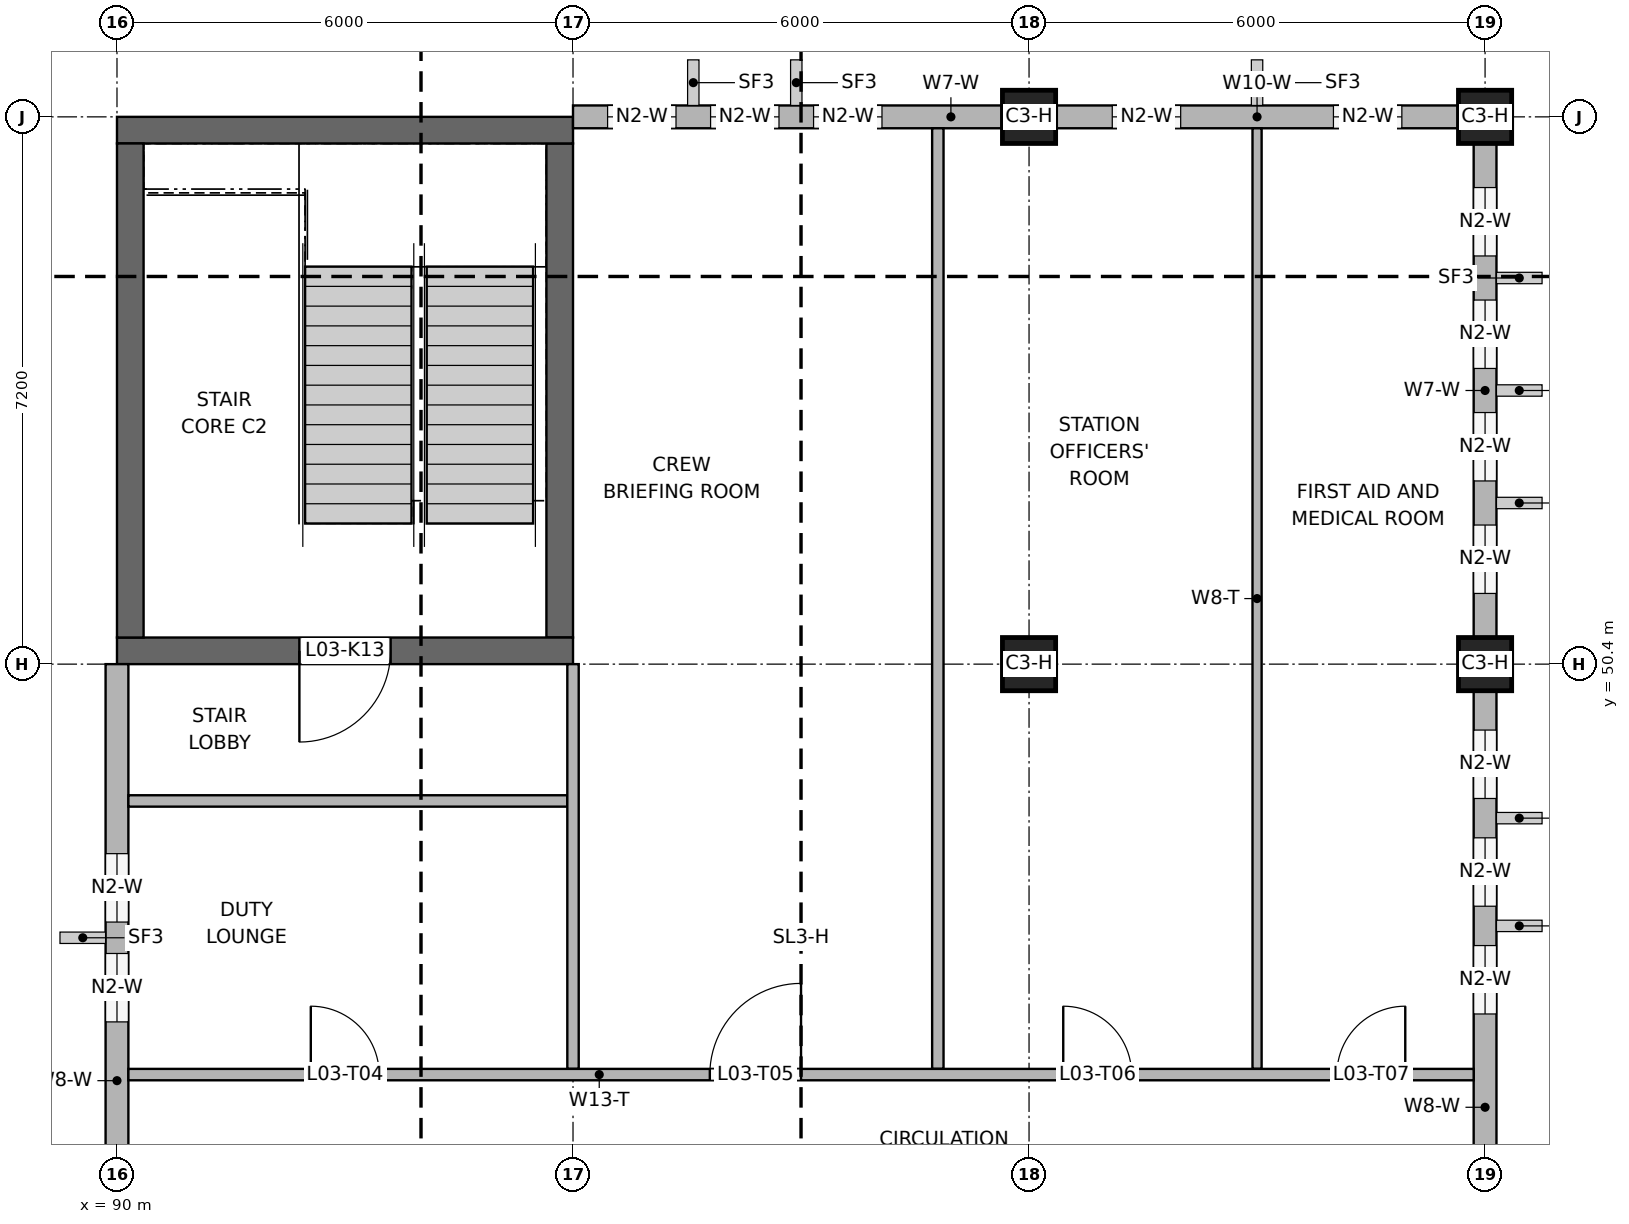
"""IFC4 building model, lengths in metres.
Left out: names, types, materials, properties, quantities, classifications, styles, units other than length and angle.
Written with IfcOpenShell. Run it as: python <this file> out.ifc"""

import sys

from ifc_helpers import new_model, si_unit, direction, frame, frame_2d, origin, origin_2d, place, context, subcontext, project, spatial, rectangle, extrude, element, fill, save


model = new_model("IFC4")
c1 = context("Model", 3, precision=1e-05, world=origin(), true_north=direction((0.0, 1.0)))
c2 = subcontext(c1, "Body", "Model", "MODEL_VIEW")
j1 = project(units=[si_unit("LENGTHUNIT", "METRE"), si_unit("PLANEANGLEUNIT", "RADIAN")], contexts=[c1])
p1 = place(None, origin())
s1 = spatial("IfcSite", under=j1, at=p1, CompositionType="ELEMENT")
p2 = place(p1, origin())
s2 = spatial("IfcBuilding", under=s1, at=p2, CompositionType="ELEMENT")
p3 = place(p2, frame((0.0, 0.0, 12.6)))
s3 = spatial("IfcBuildingStorey", under=s2, at=p3, CompositionType="ELEMENT", Elevation=12.6)
p4 = place(p3, frame((90.0, 50.575, 0.0), z_axis=(0.0, 0.0, 1.0), x_axis=(1.0, 0.0, 0.0)))
e1 = element("IfcWall", 1, at=p4, inside=s3, PredefinedType="SHEAR", context=c2, shape_type="SweptSolid", body=[
    extrude(rectangle(XDim=6.0, YDim=0.35, at=frame_2d((3.0, 0.0))), origin(), (0.0, 0.0, 1.0), 4.0),
])
p5 = place(p4, frame((2.4, 0.0, 0.0)))
e2 = element("IfcOpeningElement", 2, at=p5, cuts=e1, PredefinedType="OPENING", context=c2, shape_type="SweptSolid", body=[
    extrude(rectangle(XDim=1.2, YDim=2.1, at=frame_2d((0.6, 1.05))), frame((0.0, 0.185, 0.0), z_axis=(0.0, -1.0, 0.0), x_axis=(1.0, 0.0, 0.0)), (0.0, 0.0, 1.0), 0.37),
])
p6 = place(p3, frame((90.0, 57.425, 0.0), z_axis=(0.0, 0.0, 1.0), x_axis=(1.0, 0.0, 0.0)))
e3 = element("IfcWall", 3, at=p6, inside=s3, PredefinedType="SHEAR", context=c2, shape_type="SweptSolid", body=[
    extrude(rectangle(XDim=6.0, YDim=0.35, at=frame_2d((3.0, 0.0))), origin(), (0.0, 0.0, 1.0), 4.0),
])
for number, where, z_axis, x_axis in (
    (4, (90.175, 50.75, 0.0), (0.0, 0.0, 1.0), (0.0, 1.0, 0.0)),
    (5, (95.825, 50.75, 0.0), (0.0, 0.0, 1.0), (0.0, 1.0, 0.0)),
):
    element("IfcWall", number, at=place(p3, frame(where, z_axis=z_axis, x_axis=x_axis)), inside=s3, PredefinedType="SHEAR", context=c2, shape_type="SweptSolid", body=[
        extrude(rectangle(XDim=6.5, YDim=0.35, at=frame_2d((3.25, 0.0))), origin(), (0.0, 0.0, 1.0), 4.0),
    ])
for number, where, z_axis, x_axis in (
    (6, (102.0, 50.4, 0.0), (0.0, 0.0, 1.0), (1.0, 0.0, 0.0)),
    (7, (108.0, 50.4, 0.0), (0.0, 0.0, 1.0), (1.0, 0.0, 0.0)),
    (8, (102.0, 57.6, 0.0), (0.0, 0.0, 1.0), (1.0, 0.0, 0.0)),
    (9, (108.0, 57.6, 0.0), (0.0, 0.0, 1.0), (1.0, 0.0, 0.0)),
):
    element("IfcColumn", number, at=place(p3, frame(where, z_axis=z_axis, x_axis=x_axis)), inside=s3, PredefinedType="COLUMN", context=c2, shape_type="SweptSolid", body=[
        extrude(rectangle(XDim=0.7, YDim=0.7, at=origin_2d()), origin(), (0.0, 0.0, 1.0), 4.0),
    ])
p7 = place(p3, frame((90.0, 43.55, 0.0), z_axis=(0.0, 0.0, 1.0), x_axis=(0.0, 1.0, 0.0)))
e10 = element("IfcWall", 10, at=p7, inside=s3, PredefinedType="SOLIDWALL", context=c2, shape_type="SweptSolid", body=[
    extrude(rectangle(XDim=6.85, YDim=0.3, at=frame_2d((3.425, 0.0))), origin(), (0.0, 0.0, 1.0), 3.1),
])
p8 = place(p7, frame((2.143, 0.0, 0.9)))
e11 = element("IfcOpeningElement", 11, at=p8, cuts=e10, PredefinedType="OPENING", context=c2, shape_type="SweptSolid", body=[
    extrude(rectangle(XDim=0.9, YDim=1.2, at=frame_2d((0.45, 0.6))), frame((0.0, 0.16, 0.0), z_axis=(0.0, -1.0, 0.0), x_axis=(1.0, 0.0, 0.0)), (0.0, 0.0, 1.0), 0.32),
])
p9 = place(p7, frame((3.457, 0.0, 0.9)))
e12 = element("IfcOpeningElement", 12, at=p9, cuts=e10, PredefinedType="OPENING", context=c2, shape_type="SweptSolid", body=[
    extrude(rectangle(XDim=0.9, YDim=1.2, at=frame_2d((0.45, 0.6))), frame((0.0, 0.16, 0.0), z_axis=(0.0, -1.0, 0.0), x_axis=(1.0, 0.0, 0.0)), (0.0, 0.0, 1.0), 0.32),
])
p10 = place(p3, frame((108.0, 43.2, 0.0), z_axis=(0.0, 0.0, 1.0), x_axis=(0.0, 1.0, 0.0)))
e13 = element("IfcWall", 13, at=p10, inside=s3, PredefinedType="SOLIDWALL", context=c2, shape_type="SweptSolid", body=[
    extrude(rectangle(XDim=6.85, YDim=0.3, at=frame_2d((3.425, 0.0))), origin(), (0.0, 0.0, 1.0), 3.1),
])
p11 = place(p10, frame((2.597, 0.0, 0.9)))
e14 = element("IfcOpeningElement", 14, at=p11, cuts=e13, PredefinedType="OPENING", context=c2, shape_type="SweptSolid", body=[
    extrude(rectangle(XDim=0.9, YDim=1.2, at=frame_2d((0.45, 0.6))), frame((0.0, 0.16, 0.0), z_axis=(0.0, -1.0, 0.0), x_axis=(1.0, 0.0, 0.0)), (0.0, 0.0, 1.0), 0.32),
])
p12 = place(p10, frame((4.015, 0.0, 0.9)))
e15 = element("IfcOpeningElement", 15, at=p12, cuts=e13, PredefinedType="OPENING", context=c2, shape_type="SweptSolid", body=[
    extrude(rectangle(XDim=0.9, YDim=1.2, at=frame_2d((0.45, 0.6))), frame((0.0, 0.16, 0.0), z_axis=(0.0, -1.0, 0.0), x_axis=(1.0, 0.0, 0.0)), (0.0, 0.0, 1.0), 0.32),
])
p13 = place(p10, frame((5.433, 0.0, 0.9)))
e16 = element("IfcOpeningElement", 16, at=p13, cuts=e13, PredefinedType="OPENING", context=c2, shape_type="SweptSolid", body=[
    extrude(rectangle(XDim=0.9, YDim=1.2, at=frame_2d((0.45, 0.6))), frame((0.0, 0.16, 0.0), z_axis=(0.0, -1.0, 0.0), x_axis=(1.0, 0.0, 0.0)), (0.0, 0.0, 1.0), 0.32),
])
p14 = place(p3, frame((108.0, 50.75, 0.0), z_axis=(0.0, 0.0, 1.0), x_axis=(0.0, 1.0, 0.0)))
e17 = element("IfcWall", 17, at=p14, inside=s3, PredefinedType="SOLIDWALL", context=c2, shape_type="SweptSolid", body=[
    extrude(rectangle(XDim=6.5, YDim=0.3, at=frame_2d((3.25, 0.0))), origin(), (0.0, 0.0, 1.0), 3.2),
])
p15 = place(p14, frame((0.58, 0.0, 0.9)))
e18 = element("IfcOpeningElement", 18, at=p15, cuts=e17, PredefinedType="OPENING", context=c2, shape_type="SweptSolid", body=[
    extrude(rectangle(XDim=0.9, YDim=1.2, at=frame_2d((0.45, 0.6))), frame((0.0, 0.16, 0.0), z_axis=(0.0, -1.0, 0.0), x_axis=(1.0, 0.0, 0.0)), (0.0, 0.0, 1.0), 0.32),
])
p16 = place(p14, frame((2.06, 0.0, 0.9)))
e19 = element("IfcOpeningElement", 19, at=p16, cuts=e17, PredefinedType="OPENING", context=c2, shape_type="SweptSolid", body=[
    extrude(rectangle(XDim=0.9, YDim=1.2, at=frame_2d((0.45, 0.6))), frame((0.0, 0.16, 0.0), z_axis=(0.0, -1.0, 0.0), x_axis=(1.0, 0.0, 0.0)), (0.0, 0.0, 1.0), 0.32),
])
p17 = place(p14, frame((3.54, 0.0, 0.9)))
e20 = element("IfcOpeningElement", 20, at=p17, cuts=e17, PredefinedType="OPENING", context=c2, shape_type="SweptSolid", body=[
    extrude(rectangle(XDim=0.9, YDim=1.2, at=frame_2d((0.45, 0.6))), frame((0.0, 0.16, 0.0), z_axis=(0.0, -1.0, 0.0), x_axis=(1.0, 0.0, 0.0)), (0.0, 0.0, 1.0), 0.32),
])
p18 = place(p14, frame((5.02, 0.0, 0.9)))
e21 = element("IfcOpeningElement", 21, at=p18, cuts=e17, PredefinedType="OPENING", context=c2, shape_type="SweptSolid", body=[
    extrude(rectangle(XDim=0.9, YDim=1.2, at=frame_2d((0.45, 0.6))), frame((0.0, 0.16, 0.0), z_axis=(0.0, -1.0, 0.0), x_axis=(1.0, 0.0, 0.0)), (0.0, 0.0, 1.0), 0.32),
])
p19 = place(p3, frame((96.0, 57.6, 0.0), z_axis=(0.0, 0.0, 1.0), x_axis=(1.0, 0.0, 0.0)))
e22 = element("IfcWall", 22, at=p19, inside=s3, PredefinedType="SOLIDWALL", context=c2, shape_type="SweptSolid", body=[
    extrude(rectangle(XDim=5.65, YDim=0.3, at=frame_2d((2.825, 0.0))), origin(), (0.0, 0.0, 1.0), 3.2),
])
p20 = place(p19, frame((0.455, 0.0, 0.9)))
e23 = element("IfcOpeningElement", 23, at=p20, cuts=e22, PredefinedType="OPENING", context=c2, shape_type="SweptSolid", body=[
    extrude(rectangle(XDim=0.9, YDim=1.2, at=frame_2d((0.45, 0.6))), frame((0.0, 0.16, 0.0), z_axis=(0.0, -1.0, 0.0), x_axis=(1.0, 0.0, 0.0)), (0.0, 0.0, 1.0), 0.32),
])
p21 = place(p19, frame((1.81, 0.0, 0.9)))
e24 = element("IfcOpeningElement", 24, at=p21, cuts=e22, PredefinedType="OPENING", context=c2, shape_type="SweptSolid", body=[
    extrude(rectangle(XDim=0.9, YDim=1.2, at=frame_2d((0.45, 0.6))), frame((0.0, 0.16, 0.0), z_axis=(0.0, -1.0, 0.0), x_axis=(1.0, 0.0, 0.0)), (0.0, 0.0, 1.0), 0.32),
])
p22 = place(p19, frame((3.165, 0.0, 0.9)))
e25 = element("IfcOpeningElement", 25, at=p22, cuts=e22, PredefinedType="OPENING", context=c2, shape_type="SweptSolid", body=[
    extrude(rectangle(XDim=0.9, YDim=1.2, at=frame_2d((0.45, 0.6))), frame((0.0, 0.16, 0.0), z_axis=(0.0, -1.0, 0.0), x_axis=(1.0, 0.0, 0.0)), (0.0, 0.0, 1.0), 0.32),
])
p23 = place(p3, frame((102.35, 57.6, 0.0), z_axis=(0.0, 0.0, 1.0), x_axis=(1.0, 0.0, 0.0)))
e26 = element("IfcWall", 26, at=p23, inside=s3, PredefinedType="SOLIDWALL", context=c2, shape_type="SweptSolid", body=[
    extrude(rectangle(XDim=5.3, YDim=0.3, at=frame_2d((2.65, 0.0))), origin(), (0.0, 0.0, 1.0), 3.3),
])
p24 = place(p23, frame((0.745, 0.0, 0.9)))
e27 = element("IfcOpeningElement", 27, at=p24, cuts=e26, PredefinedType="OPENING", context=c2, shape_type="SweptSolid", body=[
    extrude(rectangle(XDim=0.9, YDim=1.2, at=frame_2d((0.45, 0.6))), frame((0.0, 0.16, 0.0), z_axis=(0.0, -1.0, 0.0), x_axis=(1.0, 0.0, 0.0)), (0.0, 0.0, 1.0), 0.32),
])
p25 = place(p23, frame((3.655, 0.0, 0.9)))
e28 = element("IfcOpeningElement", 28, at=p25, cuts=e26, PredefinedType="OPENING", context=c2, shape_type="SweptSolid", body=[
    extrude(rectangle(XDim=0.9, YDim=1.2, at=frame_2d((0.45, 0.6))), frame((0.0, 0.16, 0.0), z_axis=(0.0, -1.0, 0.0), x_axis=(1.0, 0.0, 0.0)), (0.0, 0.0, 1.0), 0.32),
])
p26 = place(p3, frame((96.0, 45.075, 0.0), z_axis=(0.0, 0.0, 1.0), x_axis=(0.0, 1.0, 0.0)))
e29 = element("IfcWall", 29, at=p26, inside=s3, PredefinedType="PARTITIONING", context=c2, shape_type="SweptSolid", body=[
    extrude(rectangle(XDim=5.325, YDim=0.15, at=frame_2d((2.663, 0.0))), origin(), (0.0, 0.0, 1.0), 4.0),
])
p27 = place(p3, frame((100.8, 45.075, 0.0), z_axis=(0.0, 0.0, 1.0), x_axis=(0.0, 1.0, 0.0)))
e30 = element("IfcWall", 30, at=p27, inside=s3, PredefinedType="PARTITIONING", context=c2, shape_type="SweptSolid", body=[
    extrude(rectangle(XDim=12.375, YDim=0.15, at=frame_2d((6.188, 0.0))), origin(), (0.0, 0.0, 1.0), 4.0),
])
p28 = place(p3, frame((105.0, 45.075, 0.0), z_axis=(0.0, 0.0, 1.0), x_axis=(0.0, 1.0, 0.0)))
e31 = element("IfcWall", 31, at=p28, inside=s3, PredefinedType="PARTITIONING", context=c2, shape_type="SweptSolid", body=[
    extrude(rectangle(XDim=12.375, YDim=0.12, at=frame_2d((6.188, 0.0))), origin(), (0.0, 0.0, 1.0), 3.3),
])
p29 = place(p3, frame((90.15, 45.0, 0.0), z_axis=(0.0, 0.0, 1.0), x_axis=(1.0, 0.0, 0.0)))
e32 = element("IfcWall", 32, at=p29, inside=s3, PredefinedType="PARTITIONING", context=c2, shape_type="SweptSolid", body=[
    extrude(rectangle(XDim=17.7, YDim=0.15, at=frame_2d((8.85, 0.0))), origin(), (0.0, 0.0, 1.0), 4.0),
])
p30 = place(p29, frame((2.4, 0.0, 0.0)))
e33 = element("IfcOpeningElement", 33, at=p30, cuts=e32, PredefinedType="OPENING", context=c2, shape_type="SweptSolid", body=[
    extrude(rectangle(XDim=0.9, YDim=2.1, at=frame_2d((0.45, 1.05))), frame((0.0, 0.085, 0.0), z_axis=(0.0, -1.0, 0.0), x_axis=(1.0, 0.0, 0.0)), (0.0, 0.0, 1.0), 0.17),
])
p31 = place(p29, frame((7.65, 0.0, 0.0)))
e34 = element("IfcOpeningElement", 34, at=p31, cuts=e32, PredefinedType="OPENING", context=c2, shape_type="SweptSolid", body=[
    extrude(rectangle(XDim=1.2, YDim=2.1, at=frame_2d((0.6, 1.05))), frame((0.0, 0.085, 0.0), z_axis=(0.0, -1.0, 0.0), x_axis=(1.0, 0.0, 0.0)), (0.0, 0.0, 1.0), 0.17),
])
p32 = place(p29, frame((12.3, 0.0, 0.0)))
e35 = element("IfcOpeningElement", 35, at=p32, cuts=e32, PredefinedType="OPENING", context=c2, shape_type="SweptSolid", body=[
    extrude(rectangle(XDim=0.9, YDim=2.1, at=frame_2d((0.45, 1.05))), frame((0.0, 0.085, 0.0), z_axis=(0.0, -1.0, 0.0), x_axis=(1.0, 0.0, 0.0)), (0.0, 0.0, 1.0), 0.17),
])
p33 = place(p29, frame((15.9, 0.0, 0.0)))
e36 = element("IfcOpeningElement", 36, at=p33, cuts=e32, PredefinedType="OPENING", context=c2, shape_type="SweptSolid", body=[
    extrude(rectangle(XDim=0.9, YDim=2.1, at=frame_2d((0.45, 1.05))), frame((0.0, 0.085, 0.0), z_axis=(0.0, -1.0, 0.0), x_axis=(1.0, 0.0, 0.0)), (0.0, 0.0, 1.0), 0.17),
])
p34 = place(p3, frame((90.15, 48.6, 0.0), z_axis=(0.0, 0.0, 1.0), x_axis=(1.0, 0.0, 0.0)))
e37 = element("IfcWall", 37, at=p34, inside=s3, PredefinedType="PARTITIONING", context=c2, shape_type="SweptSolid", body=[
    extrude(rectangle(XDim=5.775, YDim=0.15, at=frame_2d((2.888, 0.0))), origin(), (0.0, 0.0, 1.0), 4.0),
])
p35 = place(p8, origin())
e38 = element("IfcWindow", 38, at=p35, inside=s3, PartitioningType="SINGLE_PANEL", PredefinedType="WINDOW", context=c2, shape_type="SweptSolid", body=[
    extrude(rectangle(XDim=0.9, YDim=1.2, at=frame_2d((0.45, 0.6))), frame((0.0, 0.03, 0.0), z_axis=(0.0, -1.0, 0.0), x_axis=(1.0, 0.0, 0.0)), (0.0, 0.0, 1.0), 0.06),
])
fill(e11, e38)
p36 = place(p9, origin())
e39 = element("IfcWindow", 39, at=p36, inside=s3, PartitioningType="SINGLE_PANEL", PredefinedType="WINDOW", context=c2, shape_type="SweptSolid", body=[
    extrude(rectangle(XDim=0.9, YDim=1.2, at=frame_2d((0.45, 0.6))), frame((0.0, 0.03, 0.0), z_axis=(0.0, -1.0, 0.0), x_axis=(1.0, 0.0, 0.0)), (0.0, 0.0, 1.0), 0.06),
])
fill(e12, e39)
p37 = place(p11, origin())
e40 = element("IfcWindow", 40, at=p37, inside=s3, PartitioningType="SINGLE_PANEL", PredefinedType="WINDOW", context=c2, shape_type="SweptSolid", body=[
    extrude(rectangle(XDim=0.9, YDim=1.2, at=frame_2d((0.45, 0.6))), frame((0.0, 0.03, 0.0), z_axis=(0.0, -1.0, 0.0), x_axis=(1.0, 0.0, 0.0)), (0.0, 0.0, 1.0), 0.06),
])
fill(e14, e40)
p38 = place(p12, origin())
e41 = element("IfcWindow", 41, at=p38, inside=s3, PartitioningType="SINGLE_PANEL", PredefinedType="WINDOW", context=c2, shape_type="SweptSolid", body=[
    extrude(rectangle(XDim=0.9, YDim=1.2, at=frame_2d((0.45, 0.6))), frame((0.0, 0.03, 0.0), z_axis=(0.0, -1.0, 0.0), x_axis=(1.0, 0.0, 0.0)), (0.0, 0.0, 1.0), 0.06),
])
fill(e15, e41)
p39 = place(p13, origin())
e42 = element("IfcWindow", 42, at=p39, inside=s3, PartitioningType="SINGLE_PANEL", PredefinedType="WINDOW", context=c2, shape_type="SweptSolid", body=[
    extrude(rectangle(XDim=0.9, YDim=1.2, at=frame_2d((0.45, 0.6))), frame((0.0, 0.03, 0.0), z_axis=(0.0, -1.0, 0.0), x_axis=(1.0, 0.0, 0.0)), (0.0, 0.0, 1.0), 0.06),
])
fill(e16, e42)
p40 = place(p15, origin())
e43 = element("IfcWindow", 43, at=p40, inside=s3, PartitioningType="SINGLE_PANEL", PredefinedType="WINDOW", context=c2, shape_type="SweptSolid", body=[
    extrude(rectangle(XDim=0.9, YDim=1.2, at=frame_2d((0.45, 0.6))), frame((0.0, 0.03, 0.0), z_axis=(0.0, -1.0, 0.0), x_axis=(1.0, 0.0, 0.0)), (0.0, 0.0, 1.0), 0.06),
])
fill(e18, e43)
p41 = place(p16, origin())
e44 = element("IfcWindow", 44, at=p41, inside=s3, PartitioningType="SINGLE_PANEL", PredefinedType="WINDOW", context=c2, shape_type="SweptSolid", body=[
    extrude(rectangle(XDim=0.9, YDim=1.2, at=frame_2d((0.45, 0.6))), frame((0.0, 0.03, 0.0), z_axis=(0.0, -1.0, 0.0), x_axis=(1.0, 0.0, 0.0)), (0.0, 0.0, 1.0), 0.06),
])
fill(e19, e44)
p42 = place(p17, origin())
e45 = element("IfcWindow", 45, at=p42, inside=s3, PartitioningType="SINGLE_PANEL", PredefinedType="WINDOW", context=c2, shape_type="SweptSolid", body=[
    extrude(rectangle(XDim=0.9, YDim=1.2, at=frame_2d((0.45, 0.6))), frame((0.0, 0.03, 0.0), z_axis=(0.0, -1.0, 0.0), x_axis=(1.0, 0.0, 0.0)), (0.0, 0.0, 1.0), 0.06),
])
fill(e20, e45)
p43 = place(p18, origin())
e46 = element("IfcWindow", 46, at=p43, inside=s3, PartitioningType="SINGLE_PANEL", PredefinedType="WINDOW", context=c2, shape_type="SweptSolid", body=[
    extrude(rectangle(XDim=0.9, YDim=1.2, at=frame_2d((0.45, 0.6))), frame((0.0, 0.03, 0.0), z_axis=(0.0, -1.0, 0.0), x_axis=(1.0, 0.0, 0.0)), (0.0, 0.0, 1.0), 0.06),
])
fill(e21, e46)
p44 = place(p20, origin())
e47 = element("IfcWindow", 47, at=p44, inside=s3, PartitioningType="SINGLE_PANEL", PredefinedType="WINDOW", context=c2, shape_type="SweptSolid", body=[
    extrude(rectangle(XDim=0.9, YDim=1.2, at=frame_2d((0.45, 0.6))), frame((0.0, 0.03, 0.0), z_axis=(0.0, -1.0, 0.0), x_axis=(1.0, 0.0, 0.0)), (0.0, 0.0, 1.0), 0.06),
])
fill(e23, e47)
p45 = place(p21, origin())
e48 = element("IfcWindow", 48, at=p45, inside=s3, PartitioningType="SINGLE_PANEL", PredefinedType="WINDOW", context=c2, shape_type="SweptSolid", body=[
    extrude(rectangle(XDim=0.9, YDim=1.2, at=frame_2d((0.45, 0.6))), frame((0.0, 0.03, 0.0), z_axis=(0.0, -1.0, 0.0), x_axis=(1.0, 0.0, 0.0)), (0.0, 0.0, 1.0), 0.06),
])
fill(e24, e48)
p46 = place(p22, origin())
e49 = element("IfcWindow", 49, at=p46, inside=s3, PartitioningType="SINGLE_PANEL", PredefinedType="WINDOW", context=c2, shape_type="SweptSolid", body=[
    extrude(rectangle(XDim=0.9, YDim=1.2, at=frame_2d((0.45, 0.6))), frame((0.0, 0.03, 0.0), z_axis=(0.0, -1.0, 0.0), x_axis=(1.0, 0.0, 0.0)), (0.0, 0.0, 1.0), 0.06),
])
fill(e25, e49)
p47 = place(p24, origin())
e50 = element("IfcWindow", 50, at=p47, inside=s3, PartitioningType="SINGLE_PANEL", PredefinedType="WINDOW", context=c2, shape_type="SweptSolid", body=[
    extrude(rectangle(XDim=0.9, YDim=1.2, at=frame_2d((0.45, 0.6))), frame((0.0, 0.03, 0.0), z_axis=(0.0, -1.0, 0.0), x_axis=(1.0, 0.0, 0.0)), (0.0, 0.0, 1.0), 0.06),
])
fill(e27, e50)
p48 = place(p25, origin())
e51 = element("IfcWindow", 51, at=p48, inside=s3, PartitioningType="SINGLE_PANEL", PredefinedType="WINDOW", context=c2, shape_type="SweptSolid", body=[
    extrude(rectangle(XDim=0.9, YDim=1.2, at=frame_2d((0.45, 0.6))), frame((0.0, 0.03, 0.0), z_axis=(0.0, -1.0, 0.0), x_axis=(1.0, 0.0, 0.0)), (0.0, 0.0, 1.0), 0.06),
])
fill(e28, e51)
p49 = place(p5, frame((1.2, 0.0, 0.0), z_axis=(0.0, 0.0, 1.0), x_axis=(-1.0, 0.0, 0.0)))
e52 = element("IfcDoor", 52, at=p49, inside=s3, OperationType="SINGLE_SWING_RIGHT", PredefinedType="DOOR", context=c2, shape_type="SweptSolid", body=[
    extrude(rectangle(XDim=1.2, YDim=2.1, at=frame_2d((0.6, 1.05))), frame((0.0, 0.025, 0.0), z_axis=(0.0, -1.0, 0.0), x_axis=(1.0, 0.0, 0.0)), (0.0, 0.0, 1.0), 0.05),
])
fill(e2, e52)
p50 = place(p30, origin())
e53 = element("IfcDoor", 53, at=p50, inside=s3, OperationType="SINGLE_SWING_LEFT", PredefinedType="DOOR", context=c2, shape_type="SweptSolid", body=[
    extrude(rectangle(XDim=0.9, YDim=2.1, at=frame_2d((0.45, 1.05))), frame((0.0, 0.025, 0.0), z_axis=(0.0, -1.0, 0.0), x_axis=(1.0, 0.0, 0.0)), (0.0, 0.0, 1.0), 0.05),
])
fill(e33, e53)
p51 = place(p31, origin())
e54 = element("IfcDoor", 54, at=p51, inside=s3, OperationType="SINGLE_SWING_RIGHT", PredefinedType="DOOR", context=c2, shape_type="SweptSolid", body=[
    extrude(rectangle(XDim=1.2, YDim=2.1, at=frame_2d((0.6, 1.05))), frame((0.0, 0.025, 0.0), z_axis=(0.0, -1.0, 0.0), x_axis=(1.0, 0.0, 0.0)), (0.0, 0.0, 1.0), 0.05),
])
fill(e34, e54)
p52 = place(p32, origin())
e55 = element("IfcDoor", 55, at=p52, inside=s3, OperationType="SINGLE_SWING_LEFT", PredefinedType="DOOR", context=c2, shape_type="SweptSolid", body=[
    extrude(rectangle(XDim=0.9, YDim=2.1, at=frame_2d((0.45, 1.05))), frame((0.0, 0.025, 0.0), z_axis=(0.0, -1.0, 0.0), x_axis=(1.0, 0.0, 0.0)), (0.0, 0.0, 1.0), 0.05),
])
fill(e35, e55)
p53 = place(p33, origin())
e56 = element("IfcDoor", 56, at=p53, inside=s3, OperationType="SINGLE_SWING_RIGHT", PredefinedType="DOOR", context=c2, shape_type="SweptSolid", body=[
    extrude(rectangle(XDim=0.9, YDim=2.1, at=frame_2d((0.45, 1.05))), frame((0.0, 0.025, 0.0), z_axis=(0.0, -1.0, 0.0), x_axis=(1.0, 0.0, 0.0)), (0.0, 0.0, 1.0), 0.05),
])
fill(e36, e56)
save(model, sys.argv[1])
